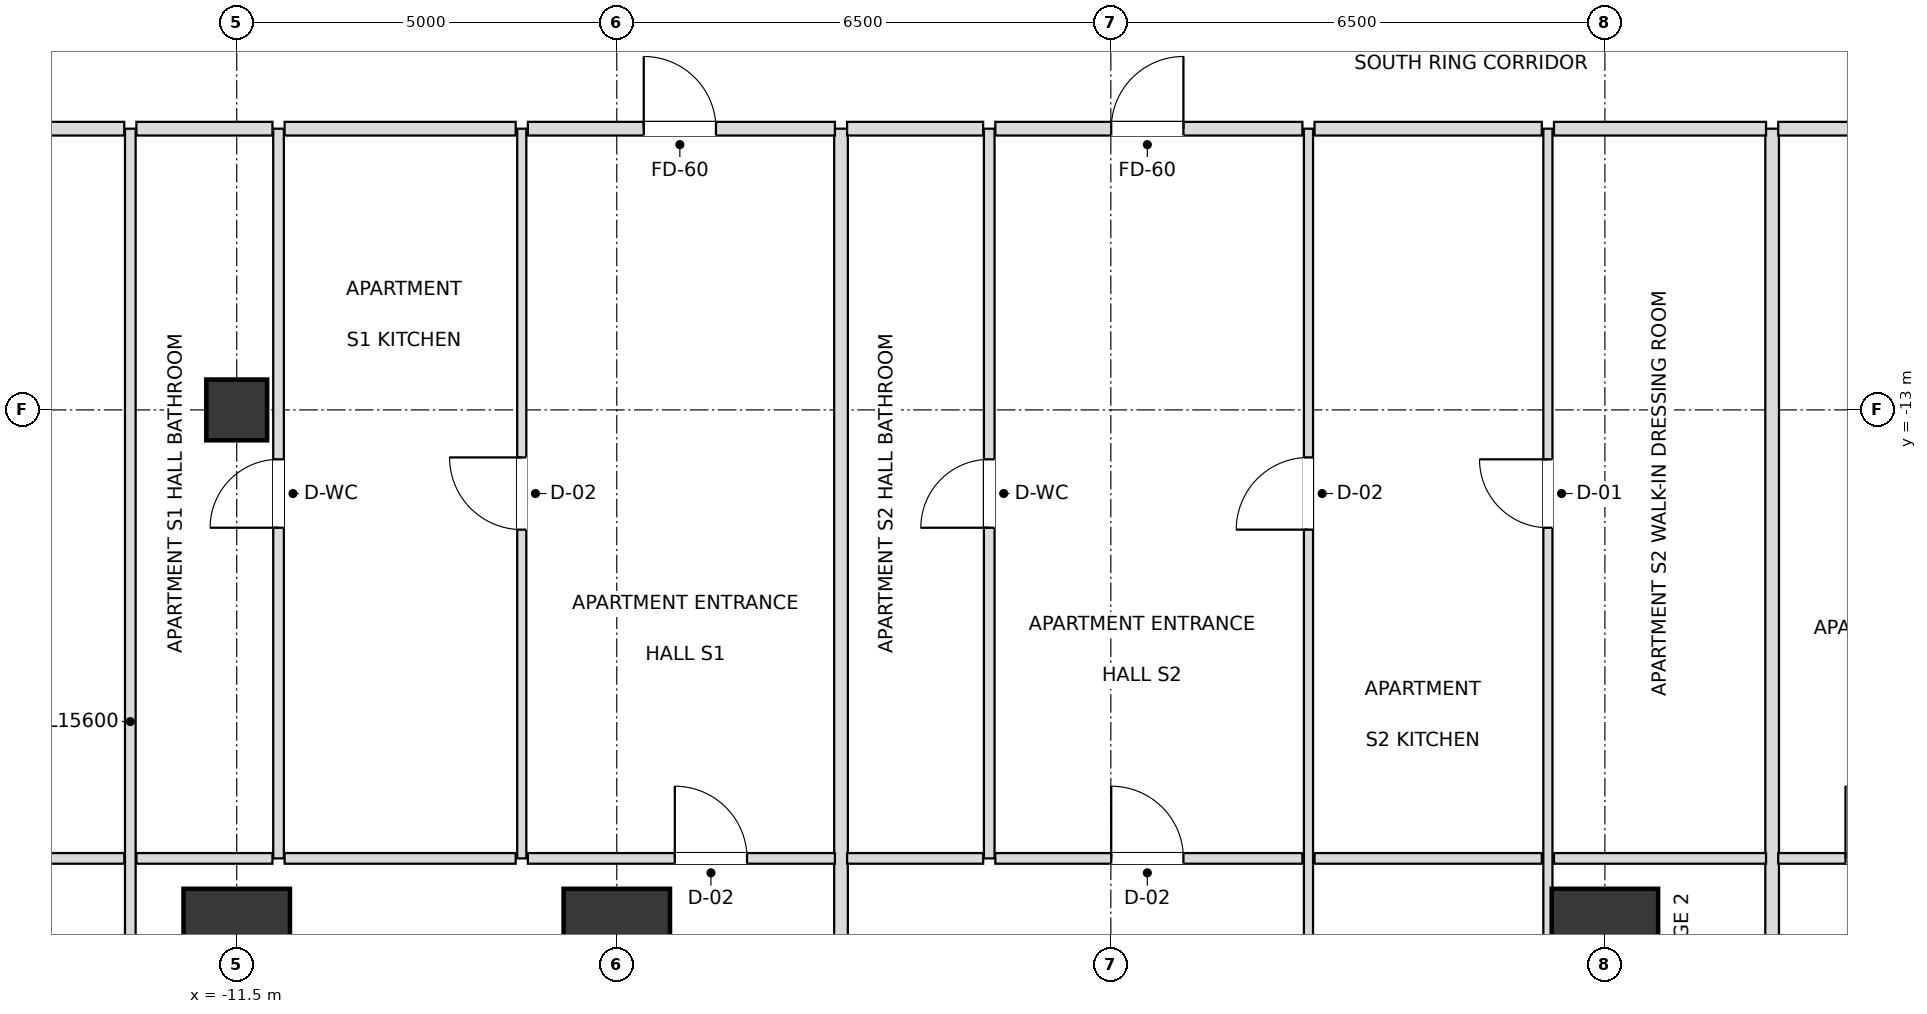
"""IFC4 building model, lengths in metres.
Left out: names, types, materials, properties, quantities, classifications, styles, units other than length and angle.
Written with IfcOpenShell. Run it as: python <this file> out.ifc"""

import sys

from ifc_helpers import new_model, si_unit, direction, frame, frame_2d, origin, origin_2d, place, context, subcontext, project, spatial, rectangle, extrude, element, fill, save


model = new_model("IFC4")
c1 = context("Model", 3, precision=1e-05, world=origin(), true_north=direction((0.0, 1.0)))
c2 = subcontext(c1, "Body", "Model", "MODEL_VIEW")
j1 = project(units=[si_unit("LENGTHUNIT", "METRE"), si_unit("PLANEANGLEUNIT", "RADIAN")], contexts=[c1])
p1 = place(None, origin())
s1 = spatial("IfcSite", under=j1, at=p1, CompositionType="ELEMENT")
p2 = place(p1, origin())
s2 = spatial("IfcBuilding", under=s1, at=p2, CompositionType="ELEMENT")
p3 = place(p2, frame((0.0, 0.0, 43.2)))
s3 = spatial("IfcBuildingStorey", under=s2, at=p3, CompositionType="ELEMENT", Elevation=43.2)
for number, where, z_axis, x_axis in (
    (1, (-11.5, -20.0, 0.0), (0.0, 0.0, 1.0), (1.0, 0.0, 0.0)),
    (2, (-6.5, -20.0, 0.0), (0.0, 0.0, 1.0), (1.0, 0.0, 0.0)),
    (3, (6.5, -20.0, 0.0), (0.0, 0.0, 1.0), (1.0, 0.0, 0.0)),
):
    element("IfcColumn", number, at=place(p3, frame(where, z_axis=z_axis, x_axis=x_axis)), inside=s3, PredefinedType="USERDEFINED", context=c2, shape_type="SweptSolid", body=[
        extrude(rectangle(XDim=1.4, YDim=1.4, at=origin_2d()), origin(), (0.0, 0.0, 1.0), 3.6),
    ])
p4 = place(p3, frame((-11.5, -13.0, 0.0), z_axis=(0.0, 0.0, 1.0), x_axis=(1.0, 0.0, 0.0)))
e4 = element("IfcColumn", 4, at=p4, inside=s3, PredefinedType="COLUMN", context=c2, shape_type="SweptSolid", body=[
    extrude(rectangle(XDim=0.8, YDim=0.8, at=origin_2d()), origin(), (0.0, 0.0, 1.0), 3.6),
])
p5 = place(p3, frame((-12.9, -24.9, 0.0), z_axis=(0.0, 0.0, 1.0), x_axis=(0.0, 1.0, 0.0)))
e5 = element("IfcWall", 5, at=p5, inside=s3, PredefinedType="PARTITIONING", context=c2, shape_type="SweptSolid", body=[
    extrude(rectangle(XDim=15.6, YDim=0.14, at=frame_2d((7.8, 0.0))), origin(), (0.0, 0.0, 1.0), 2.736),
])
p6 = place(p5, frame((2.55, 0.0, 0.0)))
e6 = element("IfcOpeningElement", 6, at=p6, cuts=e5, PredefinedType="OPENING", context=c2, shape_type="SweptSolid", body=[
    extrude(rectangle(XDim=0.9, YDim=2.1, at=frame_2d((0.45, 1.05))), frame((0.0, 0.08, 0.0), z_axis=(0.0, -1.0, 0.0), x_axis=(1.0, 0.0, 0.0)), (0.0, 0.0, 1.0), 0.16),
])
p7 = place(p3, frame((-10.95, -18.9, 0.0), z_axis=(0.0, 0.0, 1.0), x_axis=(0.0, 1.0, 0.0)))
e7 = element("IfcWall", 7, at=p7, inside=s3, PredefinedType="PARTITIONING", context=c2, shape_type="SweptSolid", body=[
    extrude(rectangle(XDim=9.6, YDim=0.14, at=frame_2d((4.8, 0.0))), origin(), (0.0, 0.0, 1.0), 2.816),
])
p8 = place(p7, frame((4.35, 0.0, 0.0)))
e8 = element("IfcOpeningElement", 8, at=p8, cuts=e7, PredefinedType="OPENING", context=c2, shape_type="SweptSolid", body=[
    extrude(rectangle(XDim=0.9, YDim=2.1, at=frame_2d((0.45, 1.05))), frame((0.0, 0.08, 0.0), z_axis=(0.0, -1.0, 0.0), x_axis=(1.0, 0.0, 0.0)), (0.0, 0.0, 1.0), 0.16),
])
p9 = place(p3, frame((-7.75, -18.9, 0.0), z_axis=(0.0, 0.0, 1.0), x_axis=(0.0, 1.0, 0.0)))
e9 = element("IfcWall", 9, at=p9, inside=s3, PredefinedType="PARTITIONING", context=c2, shape_type="SweptSolid", body=[
    extrude(rectangle(XDim=9.6, YDim=0.12, at=frame_2d((4.8, 0.0))), origin(), (0.0, 0.0, 1.0), 2.816),
])
p10 = place(p9, frame((4.325, 0.0, 0.0)))
e10 = element("IfcOpeningElement", 10, at=p10, cuts=e9, PredefinedType="OPENING", context=c2, shape_type="SweptSolid", body=[
    extrude(rectangle(XDim=0.95, YDim=2.1, at=frame_2d((0.475, 1.05))), frame((0.0, 0.07, 0.0), z_axis=(0.0, -1.0, 0.0), x_axis=(1.0, 0.0, 0.0)), (0.0, 0.0, 1.0), 0.14),
])
p11 = place(p3, frame((-3.55, -24.9, 0.0), z_axis=(0.0, 0.0, 1.0), x_axis=(0.0, 1.0, 0.0)))
e11 = element("IfcWall", 11, at=p11, inside=s3, PredefinedType="PARTITIONING", context=c2, shape_type="SweptSolid", body=[
    extrude(rectangle(XDim=15.6, YDim=0.18, at=frame_2d((7.8, 0.0))), origin(), (0.0, 0.0, 1.0), 2.816),
])
p12 = place(p3, frame((-1.6, -18.9, 0.0), z_axis=(0.0, 0.0, 1.0), x_axis=(0.0, 1.0, 0.0)))
e12 = element("IfcWall", 12, at=p12, inside=s3, PredefinedType="PARTITIONING", context=c2, shape_type="SweptSolid", body=[
    extrude(rectangle(XDim=9.6, YDim=0.14, at=frame_2d((4.8, 0.0))), origin(), (0.0, 0.0, 1.0), 2.948),
])
p13 = place(p12, frame((4.35, 0.0, 0.0)))
e13 = element("IfcOpeningElement", 13, at=p13, cuts=e12, PredefinedType="OPENING", context=c2, shape_type="SweptSolid", body=[
    extrude(rectangle(XDim=0.9, YDim=2.1, at=frame_2d((0.45, 1.05))), frame((0.0, 0.08, 0.0), z_axis=(0.0, -1.0, 0.0), x_axis=(1.0, 0.0, 0.0)), (0.0, 0.0, 1.0), 0.16),
])
p14 = place(p3, frame((2.6, -24.9, 0.0), z_axis=(0.0, 0.0, 1.0), x_axis=(0.0, 1.0, 0.0)))
e14 = element("IfcWall", 14, at=p14, inside=s3, PredefinedType="PARTITIONING", context=c2, shape_type="SweptSolid", body=[
    extrude(rectangle(XDim=15.6, YDim=0.12, at=frame_2d((7.8, 0.0))), origin(), (0.0, 0.0, 1.0), 2.816),
])
p15 = place(p14, frame((10.325, 0.0, 0.0)))
e15 = element("IfcOpeningElement", 15, at=p15, cuts=e14, PredefinedType="OPENING", context=c2, shape_type="SweptSolid", body=[
    extrude(rectangle(XDim=0.95, YDim=2.1, at=frame_2d((0.475, 1.05))), frame((0.0, 0.07, 0.0), z_axis=(0.0, -1.0, 0.0), x_axis=(1.0, 0.0, 0.0)), (0.0, 0.0, 1.0), 0.14),
])
p16 = place(p14, frame((2.55, 0.0, 0.0)))
e16 = element("IfcOpeningElement", 16, at=p16, cuts=e14, PredefinedType="OPENING", context=c2, shape_type="SweptSolid", body=[
    extrude(rectangle(XDim=0.9, YDim=2.1, at=frame_2d((0.45, 1.05))), frame((0.0, 0.07, 0.0), z_axis=(0.0, -1.0, 0.0), x_axis=(1.0, 0.0, 0.0)), (0.0, 0.0, 1.0), 0.14),
])
p17 = place(p3, frame((5.75, -24.9, 0.0), z_axis=(0.0, 0.0, 1.0), x_axis=(0.0, 1.0, 0.0)))
e17 = element("IfcWall", 17, at=p17, inside=s3, PredefinedType="PARTITIONING", context=c2, shape_type="SweptSolid", body=[
    extrude(rectangle(XDim=15.6, YDim=0.12, at=frame_2d((7.8, 0.0))), origin(), (0.0, 0.0, 1.0), 2.816),
])
p18 = place(p17, frame((10.35, 0.0, 0.0)))
e18 = element("IfcOpeningElement", 18, at=p18, cuts=e17, PredefinedType="OPENING", context=c2, shape_type="SweptSolid", body=[
    extrude(rectangle(XDim=0.9, YDim=2.1, at=frame_2d((0.45, 1.05))), frame((0.0, 0.07, 0.0), z_axis=(0.0, -1.0, 0.0), x_axis=(1.0, 0.0, 0.0)), (0.0, 0.0, 1.0), 0.14),
])
p19 = place(p17, frame((2.55, 0.0, 0.0)))
e19 = element("IfcOpeningElement", 19, at=p19, cuts=e17, PredefinedType="OPENING", context=c2, shape_type="SweptSolid", body=[
    extrude(rectangle(XDim=0.9, YDim=2.1, at=frame_2d((0.45, 1.05))), frame((0.0, 0.07, 0.0), z_axis=(0.0, -1.0, 0.0), x_axis=(1.0, 0.0, 0.0)), (0.0, 0.0, 1.0), 0.14),
])
p20 = place(p3, frame((8.7, -24.9, 0.0), z_axis=(0.0, 0.0, 1.0), x_axis=(0.0, 1.0, 0.0)))
e20 = element("IfcWall", 20, at=p20, inside=s3, PredefinedType="PARTITIONING", context=c2, shape_type="SweptSolid", body=[
    extrude(rectangle(XDim=15.6, YDim=0.18, at=frame_2d((7.8, 0.0))), origin(), (0.0, 0.0, 1.0), 2.816),
])
p21 = place(p3, frame((-18.32, -18.9, 0.0), z_axis=(0.0, 0.0, 1.0), x_axis=(1.0, 0.0, 0.0)))
e21 = element("IfcWall", 21, at=p21, inside=s3, PredefinedType="PARTITIONING", context=c2, shape_type="SweptSolid", body=[
    extrude(rectangle(XDim=5.34, YDim=0.14, at=frame_2d((2.67, 0.0))), origin(), (0.0, 0.0, 1.0), 2.736),
])
p22 = place(p21, frame((2.21, 0.0, 0.0)))
e22 = element("IfcOpeningElement", 22, at=p22, cuts=e21, PredefinedType="OPENING", context=c2, shape_type="SweptSolid", body=[
    extrude(rectangle(XDim=0.9, YDim=2.1, at=frame_2d((0.45, 1.05))), frame((0.0, 0.08, 0.0), z_axis=(0.0, -1.0, 0.0), x_axis=(1.0, 0.0, 0.0)), (0.0, 0.0, 1.0), 0.16),
])
p23 = place(p3, frame((-12.82, -18.9, 0.0), z_axis=(0.0, 0.0, 1.0), x_axis=(1.0, 0.0, 0.0)))
e23 = element("IfcWall", 23, at=p23, inside=s3, PredefinedType="PARTITIONING", context=c2, shape_type="SweptSolid", body=[
    extrude(rectangle(XDim=1.79, YDim=0.14, at=frame_2d((0.895, 0.0))), origin(), (0.0, 0.0, 1.0), 2.736),
])
p24 = place(p3, frame((-10.87, -18.9, 0.0), z_axis=(0.0, 0.0, 1.0), x_axis=(1.0, 0.0, 0.0)))
e24 = element("IfcWall", 24, at=p24, inside=s3, PredefinedType="PARTITIONING", context=c2, shape_type="SweptSolid", body=[
    extrude(rectangle(XDim=3.04, YDim=0.14, at=frame_2d((1.52, 0.0))), origin(), (0.0, 0.0, 1.0), 3.38),
])
p25 = place(p3, frame((-7.67, -18.9, 0.0), z_axis=(0.0, 0.0, 1.0), x_axis=(1.0, 0.0, 0.0)))
e25 = element("IfcWall", 25, at=p25, inside=s3, PredefinedType="PARTITIONING", context=c2, shape_type="SweptSolid", body=[
    extrude(rectangle(XDim=4.04, YDim=0.14, at=frame_2d((2.02, 0.0))), origin(), (0.0, 0.0, 1.0), 2.816),
])
p26 = place(p25, frame((1.934, 0.0, 0.0)))
e26 = element("IfcOpeningElement", 26, at=p26, cuts=e25, PredefinedType="OPENING", context=c2, shape_type="SweptSolid", body=[
    extrude(rectangle(XDim=0.95, YDim=2.1, at=frame_2d((0.475, 1.05))), frame((0.0, 0.08, 0.0), z_axis=(0.0, -1.0, 0.0), x_axis=(1.0, 0.0, 0.0)), (0.0, 0.0, 1.0), 0.16),
])
p27 = place(p3, frame((-3.47, -18.9, 0.0), z_axis=(0.0, 0.0, 1.0), x_axis=(1.0, 0.0, 0.0)))
e27 = element("IfcWall", 27, at=p27, inside=s3, PredefinedType="PARTITIONING", context=c2, shape_type="SweptSolid", body=[
    extrude(rectangle(XDim=1.79, YDim=0.14, at=frame_2d((0.895, 0.0))), origin(), (0.0, 0.0, 1.0), 3.38),
])
p28 = place(p3, frame((-1.52, -18.9, 0.0), z_axis=(0.0, 0.0, 1.0), x_axis=(1.0, 0.0, 0.0)))
e28 = element("IfcWall", 28, at=p28, inside=s3, PredefinedType="PARTITIONING", context=c2, shape_type="SweptSolid", body=[
    extrude(rectangle(XDim=4.04, YDim=0.14, at=frame_2d((2.02, 0.0))), origin(), (0.0, 0.0, 1.0), 3.38),
])
p29 = place(p28, frame((1.525, 0.0, 0.0)))
e29 = element("IfcOpeningElement", 29, at=p29, cuts=e28, PredefinedType="OPENING", context=c2, shape_type="SweptSolid", body=[
    extrude(rectangle(XDim=0.95, YDim=2.1, at=frame_2d((0.475, 1.05))), frame((0.0, 0.08, 0.0), z_axis=(0.0, -1.0, 0.0), x_axis=(1.0, 0.0, 0.0)), (0.0, 0.0, 1.0), 0.16),
])
p30 = place(p3, frame((2.68, -18.9, 0.0), z_axis=(0.0, 0.0, 1.0), x_axis=(1.0, 0.0, 0.0)))
e30 = element("IfcWall", 30, at=p30, inside=s3, PredefinedType="PARTITIONING", context=c2, shape_type="SweptSolid", body=[
    extrude(rectangle(XDim=2.99, YDim=0.14, at=frame_2d((1.495, 0.0))), origin(), (0.0, 0.0, 1.0), 3.38),
])
p31 = place(p3, frame((5.83, -18.9, 0.0), z_axis=(0.0, 0.0, 1.0), x_axis=(1.0, 0.0, 0.0)))
e31 = element("IfcWall", 31, at=p31, inside=s3, PredefinedType="PARTITIONING", context=c2, shape_type="SweptSolid", body=[
    extrude(rectangle(XDim=2.79, YDim=0.14, at=frame_2d((1.395, 0.0))), origin(), (0.0, 0.0, 1.0), 2.816),
])
p32 = place(p3, frame((8.78, -18.9, 0.0), z_axis=(0.0, 0.0, 1.0), x_axis=(1.0, 0.0, 0.0)))
e32 = element("IfcWall", 32, at=p32, inside=s3, PredefinedType="PARTITIONING", context=c2, shape_type="SweptSolid", body=[
    extrude(rectangle(XDim=3.74, YDim=0.14, at=frame_2d((1.87, 0.0))), origin(), (0.0, 0.0, 1.0), 2.736),
])
p33 = place(p32, frame((0.885, 0.0, 0.0)))
e33 = element("IfcOpeningElement", 33, at=p33, cuts=e32, PredefinedType="OPENING", context=c2, shape_type="SweptSolid", body=[
    extrude(rectangle(XDim=0.95, YDim=2.1, at=frame_2d((0.475, 1.05))), frame((0.0, 0.08, 0.0), z_axis=(0.0, -1.0, 0.0), x_axis=(1.0, 0.0, 0.0)), (0.0, 0.0, 1.0), 0.16),
])
p34 = place(p3, frame((-18.32, -9.3, 0.0), z_axis=(0.0, 0.0, 1.0), x_axis=(1.0, 0.0, 0.0)))
e34 = element("IfcWall", 34, at=p34, inside=s3, PredefinedType="PARTITIONING", context=c2, shape_type="SweptSolid", body=[
    extrude(rectangle(XDim=5.34, YDim=0.18, at=frame_2d((2.67, 0.0))), origin(), (0.0, 0.0, 1.0), 2.816),
])
p35 = place(p3, frame((-12.82, -9.3, 0.0), z_axis=(0.0, 0.0, 1.0), x_axis=(1.0, 0.0, 0.0)))
e35 = element("IfcWall", 35, at=p35, inside=s3, PredefinedType="PARTITIONING", context=c2, shape_type="SweptSolid", body=[
    extrude(rectangle(XDim=1.79, YDim=0.18, at=frame_2d((0.895, 0.0))), origin(), (0.0, 0.0, 1.0), 3.38),
])
p36 = place(p3, frame((-10.87, -9.3, 0.0), z_axis=(0.0, 0.0, 1.0), x_axis=(1.0, 0.0, 0.0)))
e36 = element("IfcWall", 36, at=p36, inside=s3, PredefinedType="PARTITIONING", context=c2, shape_type="SweptSolid", body=[
    extrude(rectangle(XDim=3.04, YDim=0.18, at=frame_2d((1.52, 0.0))), origin(), (0.0, 0.0, 1.0), 3.38),
])
p37 = place(p3, frame((-7.67, -9.3, 0.0), z_axis=(0.0, 0.0, 1.0), x_axis=(1.0, 0.0, 0.0)))
e37 = element("IfcWall", 37, at=p37, inside=s3, PredefinedType="PARTITIONING", context=c2, shape_type="SweptSolid", body=[
    extrude(rectangle(XDim=4.04, YDim=0.18, at=frame_2d((2.02, 0.0))), origin(), (0.0, 0.0, 1.0), 2.816),
])
p38 = place(p37, frame((1.525, 0.0, 0.0)))
e38 = element("IfcOpeningElement", 38, at=p38, cuts=e37, PredefinedType="OPENING", context=c2, shape_type="SweptSolid", body=[
    extrude(rectangle(XDim=0.95, YDim=2.15, at=frame_2d((0.475, 1.075))), frame((0.0, 0.1, 0.0), z_axis=(0.0, -1.0, 0.0), x_axis=(1.0, 0.0, 0.0)), (0.0, 0.0, 1.0), 0.2),
])
p39 = place(p3, frame((-3.47, -9.3, 0.0), z_axis=(0.0, 0.0, 1.0), x_axis=(1.0, 0.0, 0.0)))
e39 = element("IfcWall", 39, at=p39, inside=s3, PredefinedType="PARTITIONING", context=c2, shape_type="SweptSolid", body=[
    extrude(rectangle(XDim=1.79, YDim=0.18, at=frame_2d((0.895, 0.0))), origin(), (0.0, 0.0, 1.0), 3.38),
])
p40 = place(p3, frame((-1.52, -9.3, 0.0), z_axis=(0.0, 0.0, 1.0), x_axis=(1.0, 0.0, 0.0)))
e40 = element("IfcWall", 40, at=p40, inside=s3, PredefinedType="PARTITIONING", context=c2, shape_type="SweptSolid", body=[
    extrude(rectangle(XDim=4.04, YDim=0.18, at=frame_2d((2.02, 0.0))), origin(), (0.0, 0.0, 1.0), 3.38),
])
p41 = place(p40, frame((1.525, 0.0, 0.0)))
e41 = element("IfcOpeningElement", 41, at=p41, cuts=e40, PredefinedType="OPENING", context=c2, shape_type="SweptSolid", body=[
    extrude(rectangle(XDim=0.95, YDim=2.15, at=frame_2d((0.475, 1.075))), frame((0.0, 0.1, 0.0), z_axis=(0.0, -1.0, 0.0), x_axis=(1.0, 0.0, 0.0)), (0.0, 0.0, 1.0), 0.2),
])
p42 = place(p3, frame((2.68, -9.3, 0.0), z_axis=(0.0, 0.0, 1.0), x_axis=(1.0, 0.0, 0.0)))
e42 = element("IfcWall", 42, at=p42, inside=s3, PredefinedType="PARTITIONING", context=c2, shape_type="SweptSolid", body=[
    extrude(rectangle(XDim=2.99, YDim=0.18, at=frame_2d((1.495, 0.0))), origin(), (0.0, 0.0, 1.0), 3.38),
])
p43 = place(p3, frame((5.83, -9.3, 0.0), z_axis=(0.0, 0.0, 1.0), x_axis=(1.0, 0.0, 0.0)))
e43 = element("IfcWall", 43, at=p43, inside=s3, PredefinedType="PARTITIONING", context=c2, shape_type="SweptSolid", body=[
    extrude(rectangle(XDim=2.79, YDim=0.18, at=frame_2d((1.395, 0.0))), origin(), (0.0, 0.0, 1.0), 2.816),
])
p44 = place(p3, frame((8.78, -9.3, 0.0), z_axis=(0.0, 0.0, 1.0), x_axis=(1.0, 0.0, 0.0)))
e44 = element("IfcWall", 44, at=p44, inside=s3, PredefinedType="PARTITIONING", context=c2, shape_type="SweptSolid", body=[
    extrude(rectangle(XDim=5.19, YDim=0.18, at=frame_2d((2.595, 0.0))), origin(), (0.0, 0.0, 1.0), 3.38),
])
p45 = place(p44, frame((0.995, 0.0, 0.0)))
e45 = element("IfcOpeningElement", 45, at=p45, cuts=e44, PredefinedType="OPENING", context=c2, shape_type="SweptSolid", body=[
    extrude(rectangle(XDim=0.95, YDim=2.15, at=frame_2d((0.475, 1.075))), frame((0.0, 0.1, 0.0), z_axis=(0.0, -1.0, 0.0), x_axis=(1.0, 0.0, 0.0)), (0.0, 0.0, 1.0), 0.2),
])
p46 = place(p38, origin())
e46 = element("IfcDoor", 46, at=p46, inside=s3, OperationType="SINGLE_SWING_LEFT", PredefinedType="DOOR", context=c2, shape_type="SweptSolid", body=[
    extrude(rectangle(XDim=0.95, YDim=2.15, at=frame_2d((0.475, 1.075))), frame((0.0, 0.025, 0.0), z_axis=(0.0, -1.0, 0.0), x_axis=(1.0, 0.0, 0.0)), (0.0, 0.0, 1.0), 0.05),
])
fill(e38, e46)
p47 = place(p10, origin())
e47 = element("IfcDoor", 47, at=p47, inside=s3, OperationType="SINGLE_SWING_RIGHT", PredefinedType="DOOR", context=c2, shape_type="SweptSolid", body=[
    extrude(rectangle(XDim=0.95, YDim=2.1, at=frame_2d((0.475, 1.05))), frame((0.0, 0.025, 0.0), z_axis=(0.0, -1.0, 0.0), x_axis=(1.0, 0.0, 0.0)), (0.0, 0.0, 1.0), 0.05),
])
fill(e10, e47)
p48 = place(p8, origin())
e48 = element("IfcDoor", 48, at=p48, inside=s3, OperationType="SINGLE_SWING_LEFT", PredefinedType="DOOR", context=c2, shape_type="SweptSolid", body=[
    extrude(rectangle(XDim=0.9, YDim=2.1, at=frame_2d((0.45, 1.05))), frame((0.0, 0.025, 0.0), z_axis=(0.0, -1.0, 0.0), x_axis=(1.0, 0.0, 0.0)), (0.0, 0.0, 1.0), 0.05),
])
fill(e8, e48)
p49 = place(p26, origin())
e49 = element("IfcDoor", 49, at=p49, inside=s3, OperationType="SINGLE_SWING_LEFT", PredefinedType="DOOR", context=c2, shape_type="SweptSolid", body=[
    extrude(rectangle(XDim=0.95, YDim=2.1, at=frame_2d((0.475, 1.05))), frame((0.0, 0.025, 0.0), z_axis=(0.0, -1.0, 0.0), x_axis=(1.0, 0.0, 0.0)), (0.0, 0.0, 1.0), 0.05),
])
fill(e26, e49)
p50 = place(p13, origin())
e50 = element("IfcDoor", 50, at=p50, inside=s3, OperationType="SINGLE_SWING_LEFT", PredefinedType="DOOR", context=c2, shape_type="SweptSolid", body=[
    extrude(rectangle(XDim=0.9, YDim=2.1, at=frame_2d((0.45, 1.05))), frame((0.0, 0.025, 0.0), z_axis=(0.0, -1.0, 0.0), x_axis=(1.0, 0.0, 0.0)), (0.0, 0.0, 1.0), 0.05),
])
fill(e13, e50)
p51 = place(p41, origin())
e51 = element("IfcDoor", 51, at=p51, inside=s3, OperationType="SINGLE_SWING_RIGHT", PredefinedType="DOOR", context=c2, shape_type="SweptSolid", body=[
    extrude(rectangle(XDim=0.95, YDim=2.15, at=frame_2d((0.475, 1.075))), frame((0.0, 0.025, 0.0), z_axis=(0.0, -1.0, 0.0), x_axis=(1.0, 0.0, 0.0)), (0.0, 0.0, 1.0), 0.05),
])
fill(e41, e51)
p52 = place(p15, origin())
e52 = element("IfcDoor", 52, at=p52, inside=s3, OperationType="SINGLE_SWING_LEFT", PredefinedType="DOOR", context=c2, shape_type="SweptSolid", body=[
    extrude(rectangle(XDim=0.95, YDim=2.1, at=frame_2d((0.475, 1.05))), frame((0.0, 0.025, 0.0), z_axis=(0.0, -1.0, 0.0), x_axis=(1.0, 0.0, 0.0)), (0.0, 0.0, 1.0), 0.05),
])
fill(e15, e52)
p53 = place(p18, origin())
e53 = element("IfcDoor", 53, at=p53, inside=s3, OperationType="SINGLE_SWING_RIGHT", PredefinedType="DOOR", context=c2, shape_type="SweptSolid", body=[
    extrude(rectangle(XDim=0.9, YDim=2.1, at=frame_2d((0.45, 1.05))), frame((0.0, 0.025, 0.0), z_axis=(0.0, -1.0, 0.0), x_axis=(1.0, 0.0, 0.0)), (0.0, 0.0, 1.0), 0.05),
])
fill(e18, e53)
p54 = place(p29, origin())
e54 = element("IfcDoor", 54, at=p54, inside=s3, OperationType="SINGLE_SWING_LEFT", PredefinedType="DOOR", context=c2, shape_type="SweptSolid", body=[
    extrude(rectangle(XDim=0.95, YDim=2.1, at=frame_2d((0.475, 1.05))), frame((0.0, 0.025, 0.0), z_axis=(0.0, -1.0, 0.0), x_axis=(1.0, 0.0, 0.0)), (0.0, 0.0, 1.0), 0.05),
])
fill(e29, e54)
p55 = place(p33, origin())
e55 = element("IfcDoor", 55, at=p55, inside=s3, OperationType="SINGLE_SWING_LEFT", PredefinedType="DOOR", context=c2, shape_type="SweptSolid", body=[
    extrude(rectangle(XDim=0.95, YDim=2.1, at=frame_2d((0.475, 1.05))), frame((0.0, 0.025, 0.0), z_axis=(0.0, -1.0, 0.0), x_axis=(1.0, 0.0, 0.0)), (0.0, 0.0, 1.0), 0.05),
])
fill(e33, e55)
save(model, sys.argv[1])
